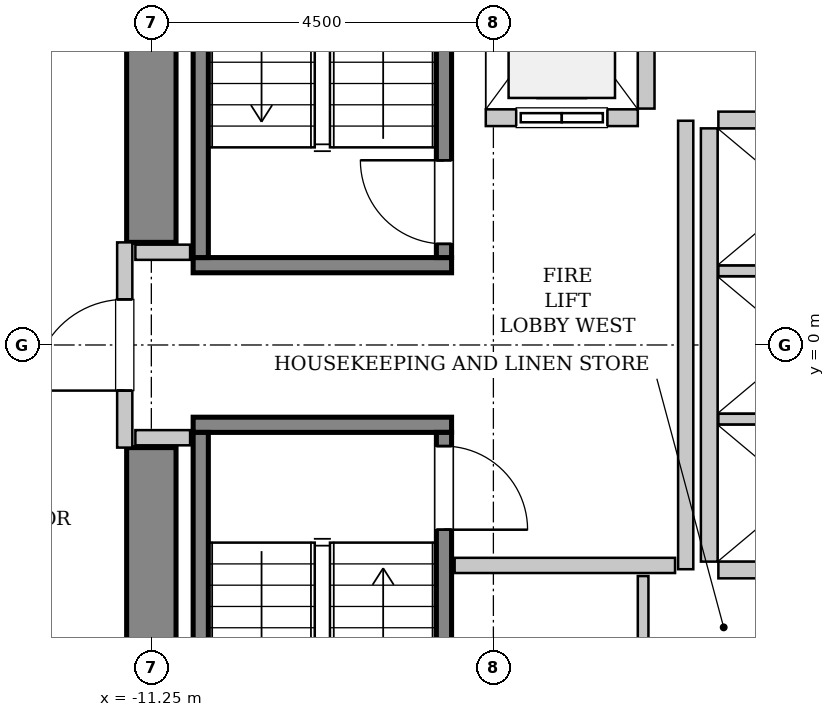
"""IFC4 building model, lengths in metres.
Left out: names, types, materials, properties, quantities, classifications, styles, units other than length and angle.
Written with IfcOpenShell. Run it as: python <this file> out.ifc"""

import sys

from ifc_helpers import new_model, si_unit, direction, frame, frame_2d, origin, place, context, subcontext, project, spatial, rectangle, extrude, source, transform, mapped, element, fill, save


model = new_model("IFC4")
c1 = context("Model", 3, precision=1e-05, world=origin(), true_north=direction((0.0, 1.0)))
c2 = subcontext(c1, "Body", "Model", "MODEL_VIEW")
j1 = project(units=[si_unit("LENGTHUNIT", "METRE"), si_unit("PLANEANGLEUNIT", "RADIAN")], contexts=[c1])
p1 = place(None, origin())
s1 = spatial("IfcSite", under=j1, at=p1, CompositionType="ELEMENT")
p2 = place(p1, origin())
s2 = spatial("IfcBuilding", under=s1, at=p2, CompositionType="ELEMENT")
p3 = place(p2, frame((0.0, 0.0, 40.6)))
s3 = spatial("IfcBuildingStorey", under=s2, at=p3, CompositionType="ELEMENT", Elevation=40.6)
m1 = source(origin(), c2, "Body", "SweptSolid", [
    extrude(rectangle(XDim=7.325, YDim=0.65, at=frame_2d((3.663, 0.0))), origin(), (0.0, 0.0, 1.0), 3.8),
])
for number, where, z_axis, x_axis in (
    (1, (-11.25, -8.675, 0.0), (0.0, 0.0, 1.0), (0.0, 1.0, 0.0)),
    (2, (-11.25, 1.35, 0.0), (0.0, 0.0, 1.0), (0.0, 1.0, 0.0)),
):
    element("IfcWall", number, at=place(p3, frame(where, z_axis=z_axis, x_axis=x_axis)), inside=s3, PredefinedType="SHEAR", context=c2, shape_type="MappedRepresentation", body=[
        mapped(m1, transform((0.0, 0.0, 0.0), x_axis=(1.0, 0.0, 0.0), y_axis=(0.0, 1.0, 0.0), z_axis=(0.0, 0.0, 1.0), scale=1.0)),
    ])
m2 = source(origin(), c2, "Body", "SweptSolid", [
    extrude(rectangle(XDim=3.4, YDim=0.2, at=frame_2d((1.7, 0.0))), origin(), (0.0, 0.0, 1.0), 3.8),
])
p4 = place(p3, frame((-7.3, 1.05, 0.0), z_axis=(0.0, 0.0, 1.0), x_axis=(-1.0, 0.0, 0.0)))
e3 = element("IfcWall", 3, at=p4, inside=s3, PredefinedType="SOLIDWALL", context=c2, shape_type="MappedRepresentation", body=[
    mapped(m2, transform((0.0, 0.0, 0.0), x_axis=(1.0, 0.0, 0.0), y_axis=(0.0, 1.0, 0.0), z_axis=(0.0, 0.0, 1.0), scale=1.0)),
])
m3 = source(origin(), c2, "Body", "SweptSolid", [
    extrude(rectangle(XDim=7.1, YDim=0.2, at=frame_2d((3.55, 0.0))), origin(), (0.0, 0.0, 1.0), 3.8),
])
p5 = place(p3, frame((-7.4, 1.15, 0.0), z_axis=(0.0, 0.0, 1.0), x_axis=(0.0, 1.0, 0.0)))
e4 = element("IfcWall", 4, at=p5, inside=s3, PredefinedType="SOLIDWALL", context=c2, shape_type="MappedRepresentation", body=[
    mapped(m3, transform((0.0, 0.0, 0.0), x_axis=(1.0, 0.0, 0.0), y_axis=(0.0, 1.0, 0.0), z_axis=(0.0, 0.0, 1.0), scale=1.0)),
])
p6 = place(p5, frame((0.18, 0.0, 0.0)))
e5 = element("IfcOpeningElement", 5, at=p6, cuts=e4, PredefinedType="OPENING", context=c2, shape_type="SweptSolid", body=[
    extrude(rectangle(XDim=1.1, YDim=2.15, at=frame_2d((0.55, 1.075))), frame((0.0, 0.11, 0.0), z_axis=(0.0, -1.0, 0.0), x_axis=(1.0, 0.0, 0.0)), (0.0, 0.0, 1.0), 0.22),
])
p7 = place(p3, frame((-10.6, 1.15, 0.0), z_axis=(0.0, 0.0, 1.0), x_axis=(0.0, 1.0, 0.0)))
e6 = element("IfcWall", 6, at=p7, inside=s3, PredefinedType="SOLIDWALL", context=c2, shape_type="MappedRepresentation", body=[
    mapped(m3, transform((0.0, 0.0, 0.0), x_axis=(1.0, 0.0, 0.0), y_axis=(0.0, 1.0, 0.0), z_axis=(0.0, 0.0, 1.0), scale=1.0)),
])
p8 = place(p3, frame((-10.7, -1.05, 0.0), z_axis=(0.0, 0.0, 1.0), x_axis=(1.0, 0.0, 0.0)))
e7 = element("IfcWall", 7, at=p8, inside=s3, PredefinedType="SOLIDWALL", context=c2, shape_type="MappedRepresentation", body=[
    mapped(m2, transform((0.0, 0.0, 0.0), x_axis=(1.0, 0.0, 0.0), y_axis=(0.0, 1.0, 0.0), z_axis=(0.0, 0.0, 1.0), scale=1.0)),
])
p9 = place(p3, frame((-10.6, -1.15, 0.0), z_axis=(0.0, 0.0, 1.0), x_axis=(0.0, -1.0, 0.0)))
e8 = element("IfcWall", 8, at=p9, inside=s3, PredefinedType="SOLIDWALL", context=c2, shape_type="MappedRepresentation", body=[
    mapped(m3, transform((0.0, 0.0, 0.0), x_axis=(1.0, 0.0, 0.0), y_axis=(0.0, 1.0, 0.0), z_axis=(0.0, 0.0, 1.0), scale=1.0)),
])
p10 = place(p3, frame((-7.4, -1.15, 0.0), z_axis=(0.0, 0.0, 1.0), x_axis=(0.0, -1.0, 0.0)))
e9 = element("IfcWall", 9, at=p10, inside=s3, PredefinedType="SOLIDWALL", context=c2, shape_type="MappedRepresentation", body=[
    mapped(m3, transform((0.0, 0.0, 0.0), x_axis=(1.0, 0.0, 0.0), y_axis=(0.0, 1.0, 0.0), z_axis=(0.0, 0.0, 1.0), scale=1.0)),
])
p11 = place(p10, frame((0.18, 0.0, 0.0)))
e10 = element("IfcOpeningElement", 10, at=p11, cuts=e9, PredefinedType="OPENING", context=c2, shape_type="SweptSolid", body=[
    extrude(rectangle(XDim=1.1, YDim=2.15, at=frame_2d((0.55, 1.075))), frame((0.0, 0.11, 0.0), z_axis=(0.0, -1.0, 0.0), x_axis=(1.0, 0.0, 0.0)), (0.0, 0.0, 1.0), 0.22),
])
m4 = source(origin(), c2, "Body", "SweptSolid", [
    extrude(rectangle(XDim=2.0, YDim=0.22, at=frame_2d((1.0, 0.0))), origin(), (0.0, 0.0, 1.0), 3.535),
])
p12 = place(p3, frame((-6.85, 2.99, 0.0), z_axis=(0.0, 0.0, 1.0), x_axis=(1.0, 0.0, 0.0)))
e11 = element("IfcWall", 11, at=p12, inside=s3, PredefinedType="SOLIDWALL", context=c2, shape_type="MappedRepresentation", body=[
    mapped(m4, transform((0.0, 0.0, 0.0), x_axis=(1.0, 0.0, 0.0), y_axis=(0.0, 1.0, 0.0), z_axis=(0.0, 0.0, 1.0), scale=1.0)),
])
p13 = place(p12, frame((0.4, 0.0, 0.0)))
e12 = element("IfcOpeningElement", 12, at=p13, cuts=e11, PredefinedType="OPENING", context=c2, shape_type="SweptSolid", body=[
    extrude(rectangle(XDim=1.2, YDim=2.2, at=frame_2d((0.6, 1.1))), frame((0.0, 0.12, 0.0), z_axis=(0.0, -1.0, 0.0), x_axis=(1.0, 0.0, 0.0)), (0.0, 0.0, 1.0), 0.24),
])
m5 = source(origin(), c2, "Body", "SweptSolid", [
    extrude(rectangle(XDim=2.68, YDim=0.22, at=frame_2d((1.34, 0.0))), origin(), (0.0, 0.0, 1.0), 3.535),
])
p14 = place(p3, frame((-4.74, 3.11, 0.0), z_axis=(0.0, 0.0, 1.0), x_axis=(0.0, 1.0, 0.0)))
e13 = element("IfcWall", 13, at=p14, inside=s3, PredefinedType="SOLIDWALL", context=c2, shape_type="MappedRepresentation", body=[
    mapped(m5, transform((0.0, 0.0, 0.0), x_axis=(1.0, 0.0, 0.0), y_axis=(0.0, 1.0, 0.0), z_axis=(0.0, 0.0, 1.0), scale=1.0)),
])
m6 = source(origin(), c2, "Body", "SweptSolid", [
    extrude(rectangle(XDim=5.7, YDim=0.22, at=frame_2d((2.85, 0.0))), origin(), (0.0, 0.0, 1.0), 3.535),
])
p15 = place(p3, frame((-3.91, 2.85, 0.0), z_axis=(0.0, 0.0, 1.0), x_axis=(0.0, -1.0, 0.0)))
e14 = element("IfcWall", 14, at=p15, inside=s3, PredefinedType="SOLIDWALL", context=c2, shape_type="MappedRepresentation", body=[
    mapped(m6, transform((0.0, 0.0, 0.0), x_axis=(1.0, 0.0, 0.0), y_axis=(0.0, 1.0, 0.0), z_axis=(0.0, 0.0, 1.0), scale=1.0)),
])
m7 = source(origin(), c2, "Body", "SweptSolid", [
    extrude(rectangle(XDim=2.13, YDim=0.22, at=frame_2d((1.065, 0.0))), origin(), (0.0, 0.0, 1.0), 3.535),
])
p16 = place(p3, frame((-3.79, -2.96, 0.0), z_axis=(0.0, 0.0, 1.0), x_axis=(1.0, 0.0, 0.0)))
e15 = element("IfcWall", 15, at=p16, inside=s3, PredefinedType="SOLIDWALL", context=c2, shape_type="MappedRepresentation", body=[
    mapped(m7, transform((0.0, 0.0, 0.0), x_axis=(1.0, 0.0, 0.0), y_axis=(0.0, 1.0, 0.0), z_axis=(0.0, 0.0, 1.0), scale=1.0)),
])
m8 = source(origin(), c2, "Body", "SweptSolid", [
    extrude(rectangle(XDim=2.13, YDim=0.14, at=frame_2d((1.065, 0.0))), origin(), (0.0, 0.0, 1.0), 3.535),
])
for number, where, z_axis, x_axis in (
    (16, (-3.79, -0.975, 0.0), (0.0, 0.0, 1.0), (1.0, 0.0, 0.0)),
    (17, (-3.79, 0.975, 0.0), (0.0, 0.0, 1.0), (1.0, 0.0, 0.0)),
):
    element("IfcWall", number, at=place(p3, frame(where, z_axis=z_axis, x_axis=x_axis)), inside=s3, PredefinedType="PARTITIONING", context=c2, shape_type="MappedRepresentation", body=[
        mapped(m8, transform((0.0, 0.0, 0.0), x_axis=(1.0, 0.0, 0.0), y_axis=(0.0, 1.0, 0.0), z_axis=(0.0, 0.0, 1.0), scale=1.0)),
    ])
p17 = place(p3, frame((-1.66, 2.96, 0.0), z_axis=(0.0, 0.0, 1.0), x_axis=(-1.0, 0.0, 0.0)))
e18 = element("IfcWall", 18, at=p17, inside=s3, PredefinedType="SOLIDWALL", context=c2, shape_type="MappedRepresentation", body=[
    mapped(m7, transform((0.0, 0.0, 0.0), x_axis=(1.0, 0.0, 0.0), y_axis=(0.0, 1.0, 0.0), z_axis=(0.0, 0.0, 1.0), scale=1.0)),
])
m9 = source(origin(), c2, "Body", "SweptSolid", [
    extrude(rectangle(XDim=2.7, YDim=0.2, at=frame_2d((1.35, 0.0))), origin(), (0.0, 0.0, 1.0), 2.425),
])
p18 = place(p3, frame((-11.6, -1.35, 0.0), z_axis=(0.0, 0.0, 1.0), x_axis=(0.0, 1.0, 0.0)))
e19 = element("IfcWall", 19, at=p18, inside=s3, PredefinedType="PARTITIONING", context=c2, shape_type="MappedRepresentation", body=[
    mapped(m9, transform((0.0, 0.0, 0.0), x_axis=(1.0, 0.0, 0.0), y_axis=(0.0, 1.0, 0.0), z_axis=(0.0, 0.0, 1.0), scale=1.0)),
])
p19 = place(p18, frame((0.75, 0.0, 0.0)))
e20 = element("IfcOpeningElement", 20, at=p19, cuts=e19, PredefinedType="OPENING", context=c2, shape_type="SweptSolid", body=[
    extrude(rectangle(XDim=1.2, YDim=2.15, at=frame_2d((0.6, 1.075))), frame((0.0, 0.11, 0.0), z_axis=(0.0, -1.0, 0.0), x_axis=(1.0, 0.0, 0.0)), (0.0, 0.0, 1.0), 0.22),
])
m10 = source(origin(), c2, "Body", "SweptSolid", [
    extrude(rectangle(XDim=5.9, YDim=0.2, at=frame_2d((2.95, 0.0))), origin(), (0.0, 0.0, 1.0), 3.535),
])
p20 = place(p3, frame((-4.22, -2.95, 0.0), z_axis=(0.0, 0.0, 1.0), x_axis=(0.0, 1.0, 0.0)))
e21 = element("IfcWall", 21, at=p20, inside=s3, PredefinedType="PARTITIONING", context=c2, shape_type="MappedRepresentation", body=[
    mapped(m10, transform((0.0, 0.0, 0.0), x_axis=(1.0, 0.0, 0.0), y_axis=(0.0, 1.0, 0.0), z_axis=(0.0, 0.0, 1.0), scale=1.0)),
])
m11 = source(origin(), c2, "Body", "SweptSolid", [
    extrude(rectangle(XDim=2.9, YDim=0.2, at=frame_2d((1.45, 0.0))), origin(), (0.0, 0.0, 1.0), 3.535),
])
p21 = place(p3, frame((-7.26, -2.9, 0.0), z_axis=(0.0, 0.0, 1.0), x_axis=(1.0, 0.0, 0.0)))
e22 = element("IfcWall", 22, at=p21, inside=s3, PredefinedType="PARTITIONING", context=c2, shape_type="MappedRepresentation", body=[
    mapped(m11, transform((0.0, 0.0, 0.0), x_axis=(1.0, 0.0, 0.0), y_axis=(0.0, 1.0, 0.0), z_axis=(0.0, 0.0, 1.0), scale=1.0)),
])
m12 = source(origin(), c2, "Body", "SweptSolid", [
    extrude(rectangle(XDim=0.72, YDim=0.2, at=frame_2d((0.36, 0.0))), origin(), (0.0, 0.0, 1.0), 3.535),
])
for number, where, z_axis, x_axis in (
    (23, (-11.46, 1.22, 0.0), (0.0, 0.0, 1.0), (1.0, 0.0, 0.0)),
    (24, (-11.46, -1.22, 0.0), (0.0, 0.0, 1.0), (1.0, 0.0, 0.0)),
):
    element("IfcWall", number, at=place(p3, frame(where, z_axis=z_axis, x_axis=x_axis)), inside=s3, PredefinedType="PARTITIONING", context=c2, shape_type="MappedRepresentation", body=[
        mapped(m12, transform((0.0, 0.0, 0.0), x_axis=(1.0, 0.0, 0.0), y_axis=(0.0, 1.0, 0.0), z_axis=(0.0, 0.0, 1.0), scale=1.0)),
    ])
m13 = source(origin(), c2, "Body", "SweptSolid", [
    extrude(rectangle(XDim=1.26, YDim=0.14, at=frame_2d((0.63, 0.0))), origin(), (0.0, 0.0, 1.0), 3.535),
])
p22 = place(p3, frame((-4.78, -4.3, 0.0), z_axis=(0.0, 0.0, 1.0), x_axis=(0.0, 1.0, 0.0)))
e25 = element("IfcWall", 25, at=p22, inside=s3, PredefinedType="PARTITIONING", context=c2, shape_type="MappedRepresentation", body=[
    mapped(m13, transform((0.0, 0.0, 0.0), x_axis=(1.0, 0.0, 0.0), y_axis=(0.0, 1.0, 0.0), z_axis=(0.0, 0.0, 1.0), scale=1.0)),
])
m14 = source(origin(), c2, "Body", "SweptSolid", [
    extrude(rectangle(XDim=1.1, YDim=2.15, at=frame_2d((0.55, 1.075))), frame((0.0, 0.025, 0.0), z_axis=(0.0, -1.0, 0.0), x_axis=(1.0, 0.0, 0.0)), (0.0, 0.0, 1.0), 0.05),
])
p23 = place(p6, origin())
e26 = element("IfcDoor", 26, at=p23, inside=s3, OperationType="SINGLE_SWING_RIGHT", PredefinedType="DOOR", context=c2, shape_type="MappedRepresentation", body=[
    mapped(m14, transform((0.0, 0.0, 0.0), x_axis=(1.0, 0.0, 0.0), y_axis=(0.0, 1.0, 0.0), z_axis=(0.0, 0.0, 1.0), scale=1.0)),
])
fill(e5, e26)
p24 = place(p11, origin())
e27 = element("IfcDoor", 27, at=p24, inside=s3, OperationType="SINGLE_SWING_RIGHT", PredefinedType="DOOR", context=c2, shape_type="MappedRepresentation", body=[
    mapped(m14, transform((0.0, 0.0, 0.0), x_axis=(1.0, 0.0, 0.0), y_axis=(0.0, 1.0, 0.0), z_axis=(0.0, 0.0, 1.0), scale=1.0)),
])
fill(e10, e27)
m15 = source(origin(), c2, "Body", "SweptSolid", [
    extrude(rectangle(XDim=1.2, YDim=2.2, at=frame_2d((0.6, 1.1))), frame((0.0, 0.025, 0.0), z_axis=(0.0, -1.0, 0.0), x_axis=(1.0, 0.0, 0.0)), (0.0, 0.0, 1.0), 0.05),
])
p25 = place(p13, origin())
e28 = element("IfcDoor", 28, at=p25, inside=s3, OperationType="SLIDING_TO_LEFT", PredefinedType="DOOR", context=c2, shape_type="MappedRepresentation", body=[
    mapped(m15, transform((0.0, 0.0, 0.0), x_axis=(1.0, 0.0, 0.0), y_axis=(0.0, 1.0, 0.0), z_axis=(0.0, 0.0, 1.0), scale=1.0)),
])
fill(e12, e28)
m16 = source(origin(), c2, "Body", "SweptSolid", [
    extrude(rectangle(XDim=1.2, YDim=2.15, at=frame_2d((0.6, 1.075))), frame((0.0, 0.025, 0.0), z_axis=(0.0, -1.0, 0.0), x_axis=(1.0, 0.0, 0.0)), (0.0, 0.0, 1.0), 0.05),
])
p26 = place(p19, origin())
e29 = element("IfcDoor", 29, at=p26, inside=s3, OperationType="SINGLE_SWING_LEFT", PredefinedType="DOOR", context=c2, shape_type="MappedRepresentation", body=[
    mapped(m16, transform((0.0, 0.0, 0.0), x_axis=(1.0, 0.0, 0.0), y_axis=(0.0, 1.0, 0.0), z_axis=(0.0, 0.0, 1.0), scale=1.0)),
])
fill(e20, e29)
save(model, sys.argv[1])
